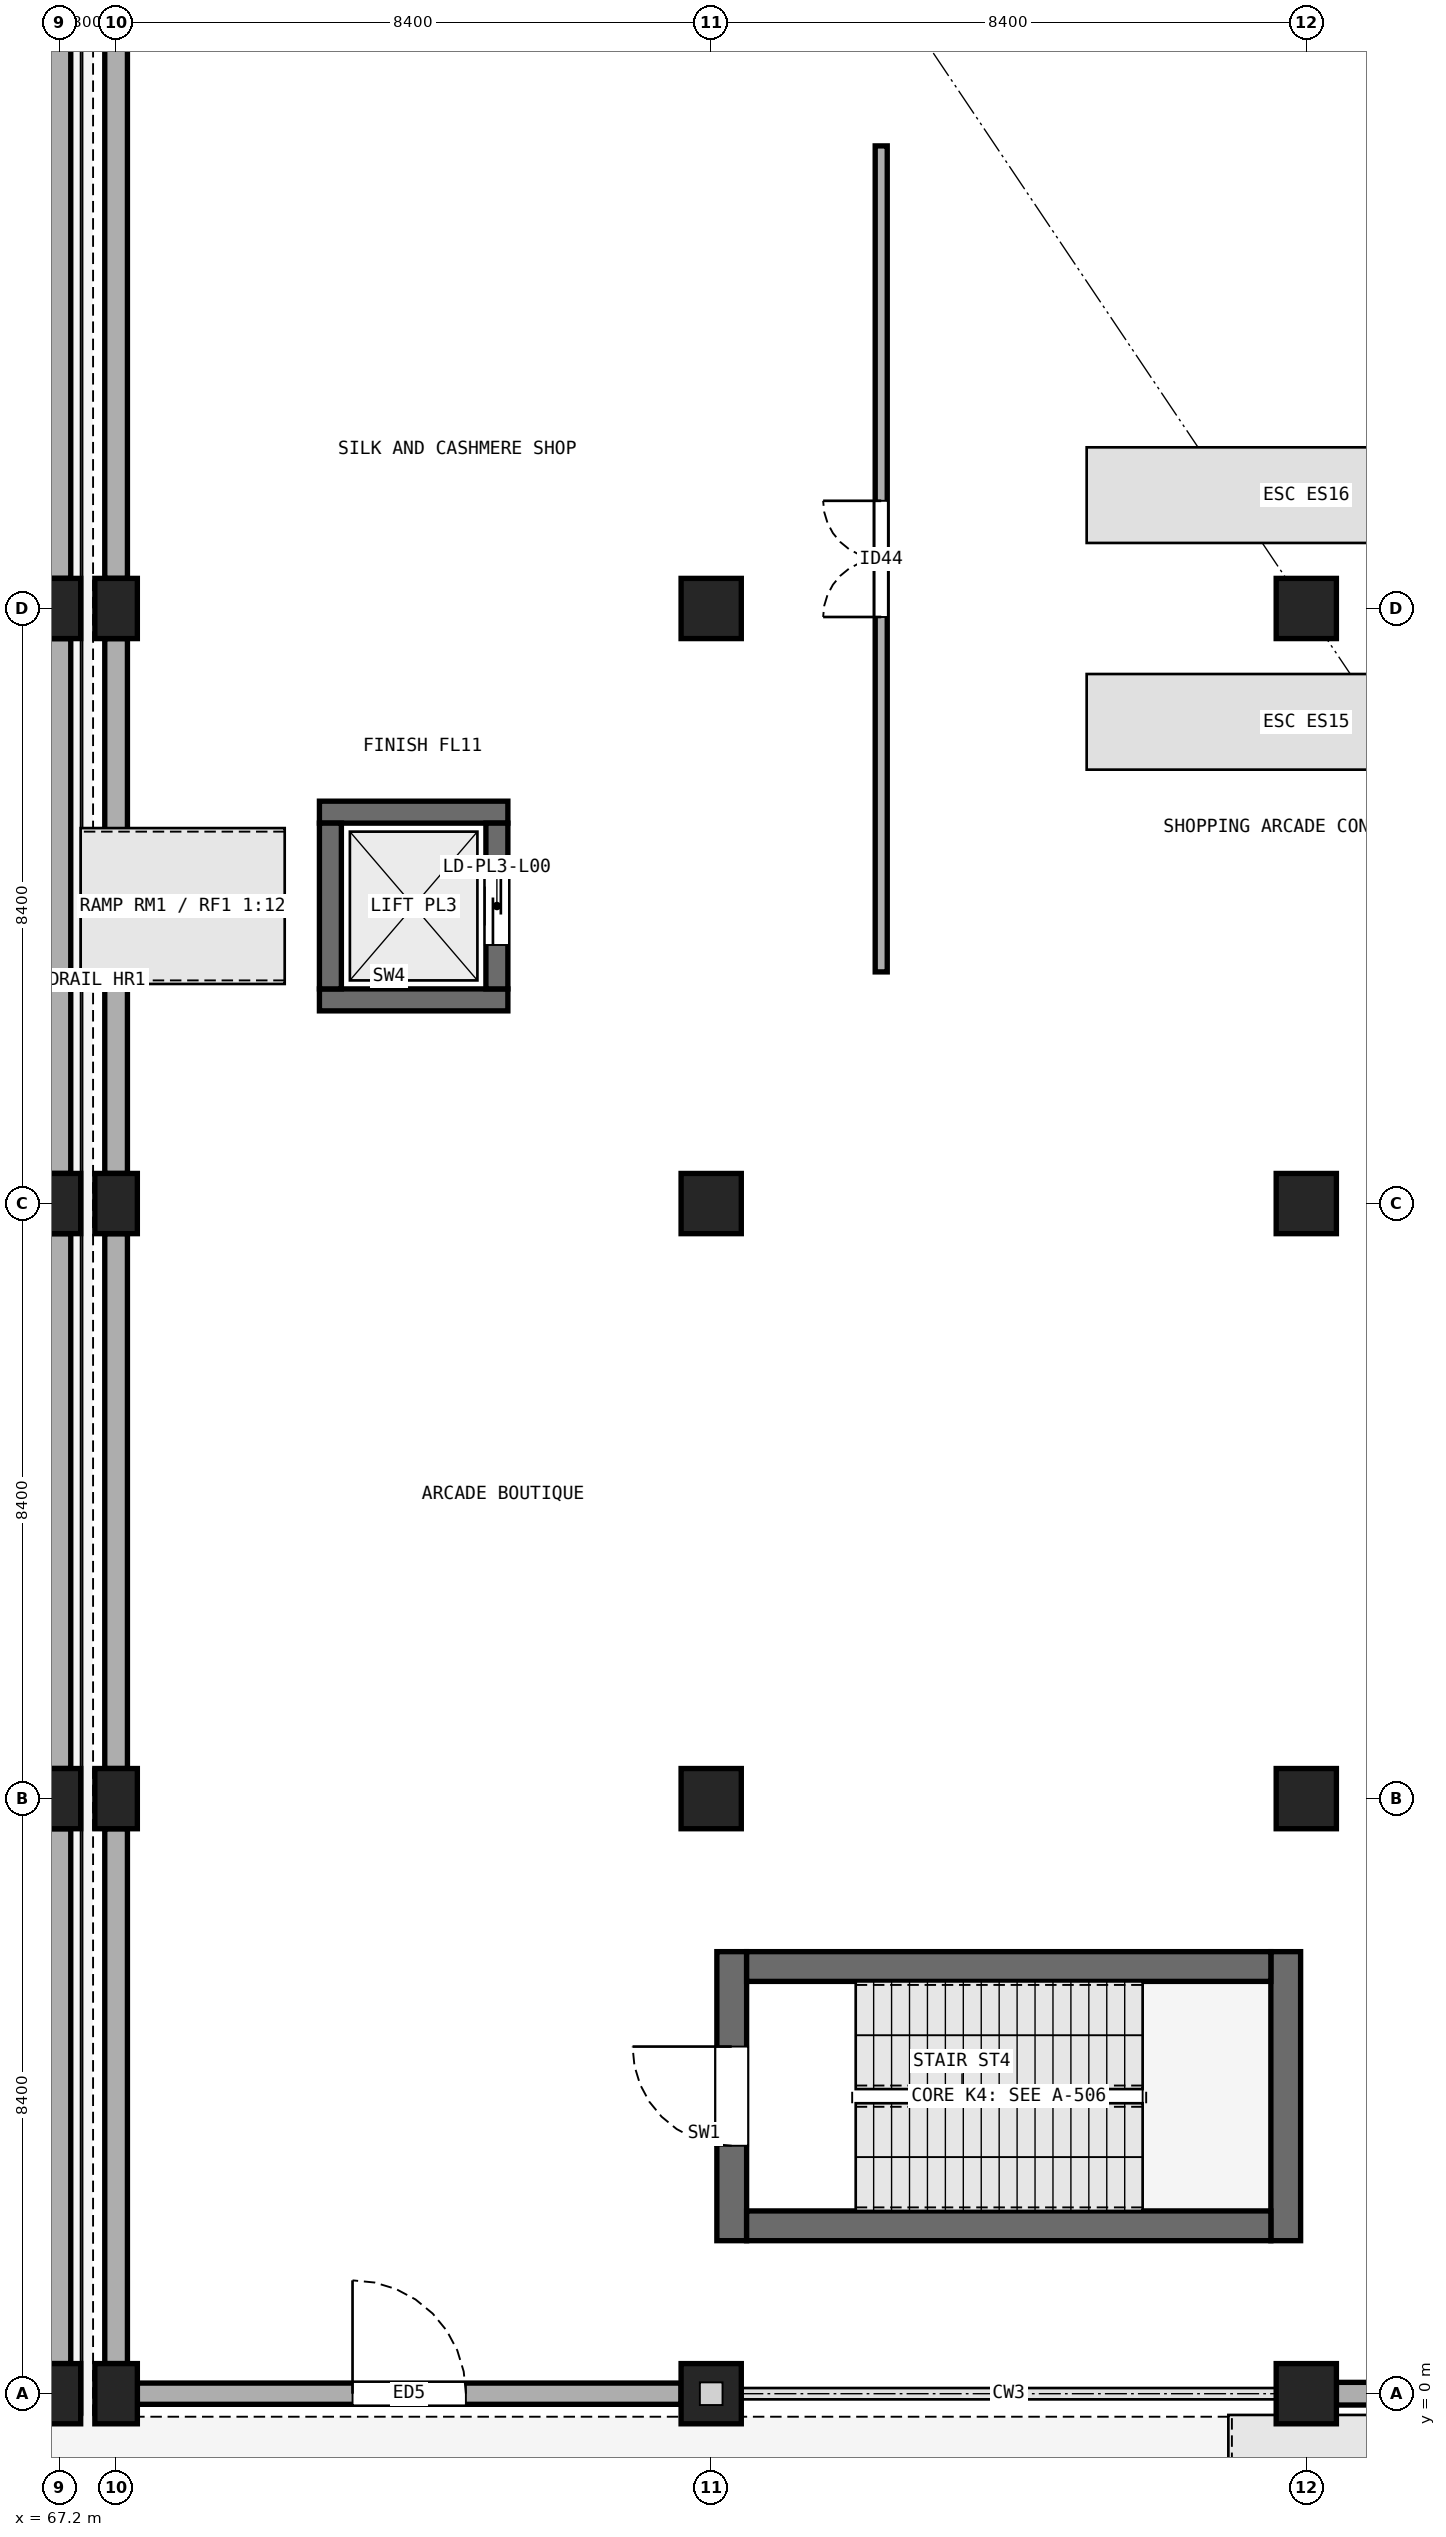
"""IFC4 building model, lengths in metres.
Left out: names, types, materials, properties, quantities, classifications, styles, units other than length and angle.
Written with IfcOpenShell. Run it as: python <this file> out.ifc"""

import sys

from ifc_helpers import new_model, si_unit, direction, frame, frame_2d, origin, origin_2d, place, context, subcontext, project, spatial, rectangle, extrude, element, fill, save


model = new_model("IFC4")
c1 = context("Model", 3, precision=1e-05, world=origin(), true_north=direction((0.0, 1.0)))
c2 = subcontext(c1, "Body", "Model", "MODEL_VIEW")
j1 = project(units=[si_unit("LENGTHUNIT", "METRE"), si_unit("PLANEANGLEUNIT", "RADIAN")], contexts=[c1])
p1 = place(None, origin())
s1 = spatial("IfcSite", under=j1, at=p1, CompositionType="ELEMENT")
p2 = place(p1, origin())
s2 = spatial("IfcBuilding", under=s1, at=p2, CompositionType="ELEMENT")
p3 = place(p2, origin())
s3 = spatial("IfcBuildingStorey", under=s2, at=p3, CompositionType="ELEMENT", Elevation=0.0)
p4 = place(p3, frame((68.0, 0.0, 0.0), z_axis=(0.0, 0.0, 1.0), x_axis=(1.0, 0.0, 0.0)))
e1 = element("IfcColumn", 1, at=p4, inside=s3, PredefinedType="COLUMN", context=c2, shape_type="SweptSolid", body=[
    extrude(rectangle(XDim=0.6, YDim=0.85, at=origin_2d()), origin(), (0.0, 0.0, 1.0), 5.4),
])
for number, where, z_axis, x_axis in (
    (2, (76.4, 0.0, 0.0), (0.0, 0.0, 1.0), (1.0, 0.0, 0.0)),
    (3, (84.8, 0.0, 0.0), (0.0, 0.0, 1.0), (1.0, 0.0, 0.0)),
):
    element("IfcColumn", number, at=place(p3, frame(where, z_axis=z_axis, x_axis=x_axis)), inside=s3, PredefinedType="COLUMN", context=c2, shape_type="SweptSolid", body=[
        extrude(rectangle(XDim=0.85, YDim=0.85, at=origin_2d()), origin(), (0.0, 0.0, 1.0), 5.4),
    ])
p5 = place(p3, frame((68.0, 8.4, 0.0), z_axis=(0.0, 0.0, 1.0), x_axis=(1.0, 0.0, 0.0)))
e4 = element("IfcColumn", 4, at=p5, inside=s3, PredefinedType="COLUMN", context=c2, shape_type="SweptSolid", body=[
    extrude(rectangle(XDim=0.6, YDim=0.85, at=origin_2d()), origin(), (0.0, 0.0, 1.0), 5.4),
])
for number, where, z_axis, x_axis in (
    (5, (76.4, 8.4, 0.0), (0.0, 0.0, 1.0), (1.0, 0.0, 0.0)),
    (6, (84.8, 8.4, 0.0), (0.0, 0.0, 1.0), (1.0, 0.0, 0.0)),
):
    element("IfcColumn", number, at=place(p3, frame(where, z_axis=z_axis, x_axis=x_axis)), inside=s3, PredefinedType="COLUMN", context=c2, shape_type="SweptSolid", body=[
        extrude(rectangle(XDim=0.85, YDim=0.85, at=origin_2d()), origin(), (0.0, 0.0, 1.0), 5.4),
    ])
p6 = place(p3, frame((68.0, 16.8, 0.0), z_axis=(0.0, 0.0, 1.0), x_axis=(1.0, 0.0, 0.0)))
e7 = element("IfcColumn", 7, at=p6, inside=s3, PredefinedType="COLUMN", context=c2, shape_type="SweptSolid", body=[
    extrude(rectangle(XDim=0.6, YDim=0.85, at=origin_2d()), origin(), (0.0, 0.0, 1.0), 5.4),
])
for number, where, z_axis, x_axis in (
    (8, (76.4, 16.8, 0.0), (0.0, 0.0, 1.0), (1.0, 0.0, 0.0)),
    (9, (84.8, 16.8, 0.0), (0.0, 0.0, 1.0), (1.0, 0.0, 0.0)),
):
    element("IfcColumn", number, at=place(p3, frame(where, z_axis=z_axis, x_axis=x_axis)), inside=s3, PredefinedType="COLUMN", context=c2, shape_type="SweptSolid", body=[
        extrude(rectangle(XDim=0.85, YDim=0.85, at=origin_2d()), origin(), (0.0, 0.0, 1.0), 5.4),
    ])
p7 = place(p3, frame((68.0, 25.2, 0.0), z_axis=(0.0, 0.0, 1.0), x_axis=(1.0, 0.0, 0.0)))
e10 = element("IfcColumn", 10, at=p7, inside=s3, PredefinedType="COLUMN", context=c2, shape_type="SweptSolid", body=[
    extrude(rectangle(XDim=0.6, YDim=0.85, at=origin_2d()), origin(), (0.0, 0.0, 1.0), 5.4),
])
for number, where, z_axis, x_axis in (
    (11, (76.4, 25.2, 0.0), (0.0, 0.0, 1.0), (1.0, 0.0, 0.0)),
    (12, (84.8, 25.2, 0.0), (0.0, 0.0, 1.0), (1.0, 0.0, 0.0)),
):
    element("IfcColumn", number, at=place(p3, frame(where, z_axis=z_axis, x_axis=x_axis)), inside=s3, PredefinedType="COLUMN", context=c2, shape_type="SweptSolid", body=[
        extrude(rectangle(XDim=0.85, YDim=0.85, at=origin_2d()), origin(), (0.0, 0.0, 1.0), 5.4),
    ])
for number, where, z_axis, x_axis in (
    (13, (67.2, 0.0, 0.0), (0.0, 0.0, 1.0), (1.0, 0.0, 0.0)),
    (14, (67.2, 8.4, 0.0), (0.0, 0.0, 1.0), (1.0, 0.0, 0.0)),
    (15, (67.2, 16.8, 0.0), (0.0, 0.0, 1.0), (1.0, 0.0, 0.0)),
    (16, (67.2, 25.2, 0.0), (0.0, 0.0, 1.0), (1.0, 0.0, 0.0)),
):
    element("IfcColumn", number, at=place(p3, frame(where, z_axis=z_axis, x_axis=x_axis)), inside=s3, PredefinedType="COLUMN", context=c2, shape_type="SweptSolid", body=[
        extrude(rectangle(XDim=0.6, YDim=0.85, at=origin_2d()), origin(), (0.0, 0.0, 1.0), 5.4),
    ])
p8 = place(p3, frame((68.3, 0.0, 0.0), z_axis=(0.0, 0.0, 1.0), x_axis=(1.0, 0.0, 0.0)))
e17 = element("IfcWall", 17, at=p8, inside=s3, PredefinedType="SOLIDWALL", context=c2, shape_type="SweptSolid", body=[
    extrude(rectangle(XDim=7.675, YDim=0.3, at=frame_2d((3.837, 0.0))), origin(), (0.0, 0.0, 1.0), 4.35),
])
p9 = place(p8, frame((3.038, 0.0, 0.0)))
e18 = element("IfcOpeningElement", 18, at=p9, cuts=e17, PredefinedType="OPENING", context=c2, shape_type="SweptSolid", body=[
    extrude(rectangle(XDim=1.6, YDim=2.3, at=frame_2d((0.8, 1.15))), frame((0.0, 0.16, 0.0), z_axis=(0.0, -1.0, 0.0), x_axis=(1.0, 0.0, 0.0)), (0.0, 0.0, 1.0), 0.32),
])
p10 = place(p3, frame((85.225, 0.0, 0.0), z_axis=(0.0, 0.0, 1.0), x_axis=(1.0, 0.0, 0.0)))
e19 = element("IfcWall", 19, at=p10, inside=s3, PredefinedType="SOLIDWALL", context=c2, shape_type="SweptSolid", body=[
    extrude(rectangle(XDim=7.55, YDim=0.32, at=frame_2d((3.775, 0.0))), origin(), (0.0, 0.0, 1.0), 4.35),
])
p11 = place(p10, frame((2.575, 0.0, 0.0)))
e20 = element("IfcOpeningElement", 20, at=p11, cuts=e19, PredefinedType="OPENING", context=c2, shape_type="SweptSolid", body=[
    extrude(rectangle(XDim=2.4, YDim=2.6, at=frame_2d((1.2, 1.3))), frame((0.0, 0.17, 0.0), z_axis=(0.0, -1.0, 0.0), x_axis=(1.0, 0.0, 0.0)), (0.0, 0.0, 1.0), 0.34),
])
for number, where, z_axis, x_axis in (
    (21, (68.0, 0.425, 0.0), (0.0, 0.0, 1.0), (0.0, 1.0, 0.0)),
    (22, (68.0, 8.825, 0.0), (0.0, 0.0, 1.0), (0.0, 1.0, 0.0)),
):
    element("IfcWall", number, at=place(p3, frame(where, z_axis=z_axis, x_axis=x_axis)), inside=s3, PredefinedType="SOLIDWALL", context=c2, shape_type="SweptSolid", body=[
        extrude(rectangle(XDim=7.55, YDim=0.32, at=frame_2d((3.775, 0.0))), origin(), (0.0, 0.0, 1.0), 4.35),
    ])
p12 = place(p3, frame((68.0, 17.225, 0.0), z_axis=(0.0, 0.0, 1.0), x_axis=(0.0, 1.0, 0.0)))
e23 = element("IfcWall", 23, at=p12, inside=s3, PredefinedType="SOLIDWALL", context=c2, shape_type="SweptSolid", body=[
    extrude(rectangle(XDim=7.55, YDim=0.32, at=frame_2d((3.775, 0.0))), origin(), (0.0, 0.0, 1.0), 4.35),
])
p13 = place(p3, frame((68.0, 25.625, 0.0), z_axis=(0.0, 0.0, 1.0), x_axis=(0.0, 1.0, 0.0)))
e24 = element("IfcWall", 24, at=p13, inside=s3, PredefinedType="SOLIDWALL", context=c2, shape_type="SweptSolid", body=[
    extrude(rectangle(XDim=7.55, YDim=0.32, at=frame_2d((3.775, 0.0))), origin(), (0.0, 0.0, 1.0), 4.35),
])
for number, where, z_axis, x_axis in (
    (25, (67.2, 0.425, 0.0), (0.0, 0.0, 1.0), (0.0, 1.0, 0.0)),
    (26, (67.2, 8.825, 0.0), (0.0, 0.0, 1.0), (0.0, 1.0, 0.0)),
):
    element("IfcWall", number, at=place(p3, frame(where, z_axis=z_axis, x_axis=x_axis)), inside=s3, PredefinedType="SOLIDWALL", context=c2, shape_type="SweptSolid", body=[
        extrude(rectangle(XDim=7.55, YDim=0.32, at=frame_2d((3.775, 0.0))), origin(), (0.0, 0.0, 1.0), 4.33),
    ])
p14 = place(p3, frame((67.2, 17.225, 0.0), z_axis=(0.0, 0.0, 1.0), x_axis=(0.0, 1.0, 0.0)))
e27 = element("IfcWall", 27, at=p14, inside=s3, PredefinedType="SOLIDWALL", context=c2, shape_type="SweptSolid", body=[
    extrude(rectangle(XDim=7.55, YDim=0.32, at=frame_2d((3.775, 0.0))), origin(), (0.0, 0.0, 1.0), 4.33),
])
p15 = place(p3, frame((67.2, 25.625, 0.0), z_axis=(0.0, 0.0, 1.0), x_axis=(0.0, 1.0, 0.0)))
e28 = element("IfcWall", 28, at=p15, inside=s3, PredefinedType="SOLIDWALL", context=c2, shape_type="SweptSolid", body=[
    extrude(rectangle(XDim=7.55, YDim=0.32, at=frame_2d((3.775, 0.0))), origin(), (0.0, 0.0, 1.0), 4.33),
])
p16 = place(p3, frame((76.69, 2.16, 0.0), z_axis=(0.0, 0.0, 1.0), x_axis=(0.0, 1.0, 0.0)))
e29 = element("IfcWall", 29, at=p16, inside=s3, PredefinedType="SHEAR", context=c2, shape_type="SweptSolid", body=[
    extrude(rectangle(XDim=4.08, YDim=0.42, at=frame_2d((2.04, 0.0))), origin(), (0.0, 0.0, 1.0), 5.1),
])
p17 = place(p16, frame((1.34, 0.0, 0.0)))
e30 = element("IfcOpeningElement", 30, at=p17, cuts=e29, PredefinedType="OPENING", context=c2, shape_type="SweptSolid", body=[
    extrude(rectangle(XDim=1.4, YDim=2.15, at=frame_2d((0.7, 1.075))), frame((0.0, 0.22, 0.0), z_axis=(0.0, -1.0, 0.0), x_axis=(1.0, 0.0, 0.0)), (0.0, 0.0, 1.0), 0.44),
])
p18 = place(p3, frame((84.51, 2.16, 0.0), z_axis=(0.0, 0.0, 1.0), x_axis=(0.0, 1.0, 0.0)))
e31 = element("IfcWall", 31, at=p18, inside=s3, PredefinedType="SHEAR", context=c2, shape_type="SweptSolid", body=[
    extrude(rectangle(XDim=4.08, YDim=0.42, at=frame_2d((2.04, 0.0))), origin(), (0.0, 0.0, 1.0), 5.1),
])
for number, where, z_axis, x_axis in (
    (32, (76.9, 2.37, 0.0), (0.0, 0.0, 1.0), (1.0, 0.0, 0.0)),
    (33, (76.9, 6.03, 0.0), (0.0, 0.0, 1.0), (1.0, 0.0, 0.0)),
):
    element("IfcWall", number, at=place(p3, frame(where, z_axis=z_axis, x_axis=x_axis)), inside=s3, PredefinedType="SHEAR", context=c2, shape_type="SweptSolid", body=[
        extrude(rectangle(XDim=7.4, YDim=0.42, at=frame_2d((3.7, 0.0))), origin(), (0.0, 0.0, 1.0), 5.1),
    ])
for number, where, z_axis, x_axis in (
    (34, (70.87, 19.675, 0.0), (0.0, 0.0, 1.0), (1.0, 0.0, 0.0)),
    (35, (70.87, 22.325, 0.0), (0.0, 0.0, 1.0), (1.0, 0.0, 0.0)),
):
    element("IfcWall", number, at=place(p3, frame(where, z_axis=z_axis, x_axis=x_axis)), inside=s3, PredefinedType="SHEAR", context=c2, shape_type="SweptSolid", body=[
        extrude(rectangle(XDim=2.66, YDim=0.31, at=frame_2d((1.33, 0.0))), origin(), (0.0, 0.0, 1.0), 5.1),
    ])
p19 = place(p3, frame((71.025, 19.83, 0.0), z_axis=(0.0, 0.0, 1.0), x_axis=(0.0, 1.0, 0.0)))
e36 = element("IfcWall", 36, at=p19, inside=s3, PredefinedType="SHEAR", context=c2, shape_type="SweptSolid", body=[
    extrude(rectangle(XDim=2.34, YDim=0.31, at=frame_2d((1.17, 0.0))), origin(), (0.0, 0.0, 1.0), 5.1),
])
p20 = place(p3, frame((73.375, 19.83, 0.0), z_axis=(0.0, 0.0, 1.0), x_axis=(0.0, 1.0, 0.0)))
e37 = element("IfcWall", 37, at=p20, inside=s3, PredefinedType="SHEAR", context=c2, shape_type="SweptSolid", body=[
    extrude(rectangle(XDim=2.34, YDim=0.31, at=frame_2d((1.17, 0.0))), origin(), (0.0, 0.0, 1.0), 5.1),
])
p21 = place(p20, frame((0.62, 0.0, 0.0)))
e38 = element("IfcOpeningElement", 38, at=p21, cuts=e37, PredefinedType="OPENING", context=c2, shape_type="SweptSolid", body=[
    extrude(rectangle(XDim=1.1, YDim=2.2, at=frame_2d((0.55, 1.1))), frame((0.0, 0.165, 0.0), z_axis=(0.0, -1.0, 0.0), x_axis=(1.0, 0.0, 0.0)), (0.0, 0.0, 1.0), 0.33),
])
p22 = place(p3, frame((78.8, 20.07, 0.0), z_axis=(0.0, 0.0, 1.0), x_axis=(0.0, 1.0, 0.0)))
e39 = element("IfcWall", 39, at=p22, inside=s3, PredefinedType="PARTITIONING", context=c2, shape_type="SweptSolid", body=[
    extrude(rectangle(XDim=11.66, YDim=0.17, at=frame_2d((5.83, 0.0))), origin(), (0.0, 0.0, 1.0), 4.4),
])
p23 = place(p22, frame((5.01, 0.0, 0.0)))
e40 = element("IfcOpeningElement", 40, at=p23, cuts=e39, PredefinedType="OPENING", context=c2, shape_type="SweptSolid", body=[
    extrude(rectangle(XDim=1.64, YDim=2.22, at=frame_2d((0.82, 1.11))), frame((0.0, 0.095, 0.0), z_axis=(0.0, -1.0, 0.0), x_axis=(1.0, 0.0, 0.0)), (0.0, 0.0, 1.0), 0.19),
])
p24 = place(p9, origin())
e41 = element("IfcDoor", 41, at=p24, inside=s3, OperationType="SINGLE_SWING_LEFT", PredefinedType="DOOR", context=c2, shape_type="SweptSolid", body=[
    extrude(rectangle(XDim=1.6, YDim=2.3, at=frame_2d((0.8, 1.15))), frame((0.0, 0.025, 0.0), z_axis=(0.0, -1.0, 0.0), x_axis=(1.0, 0.0, 0.0)), (0.0, 0.0, 1.0), 0.05),
])
fill(e18, e41)
p25 = place(p17, origin())
e42 = element("IfcDoor", 42, at=p25, inside=s3, OperationType="SINGLE_SWING_RIGHT", PredefinedType="DOOR", context=c2, shape_type="SweptSolid", body=[
    extrude(rectangle(XDim=1.4, YDim=2.15, at=frame_2d((0.7, 1.075))), frame((0.0, 0.025, 0.0), z_axis=(0.0, -1.0, 0.0), x_axis=(1.0, 0.0, 0.0)), (0.0, 0.0, 1.0), 0.05),
])
fill(e30, e42)
p26 = place(p21, origin())
e43 = element("IfcDoor", 43, at=p26, inside=s3, OperationType="SLIDING_TO_LEFT", PredefinedType="DOOR", context=c2, shape_type="SweptSolid", body=[
    extrude(rectangle(XDim=1.1, YDim=2.2, at=frame_2d((0.55, 1.1))), frame((0.0, 0.025, 0.0), z_axis=(0.0, -1.0, 0.0), x_axis=(1.0, 0.0, 0.0)), (0.0, 0.0, 1.0), 0.05),
])
fill(e38, e43)
p27 = place(p23, origin())
e44 = element("IfcDoor", 44, at=p27, inside=s3, OperationType="DOUBLE_DOOR_SINGLE_SWING", PredefinedType="DOOR", context=c2, shape_type="SweptSolid", body=[
    extrude(rectangle(XDim=1.64, YDim=2.22, at=frame_2d((0.82, 1.11))), frame((0.0, 0.025, 0.0), z_axis=(0.0, -1.0, 0.0), x_axis=(1.0, 0.0, 0.0)), (0.0, 0.0, 1.0), 0.05),
])
fill(e40, e44)
save(model, sys.argv[1])
